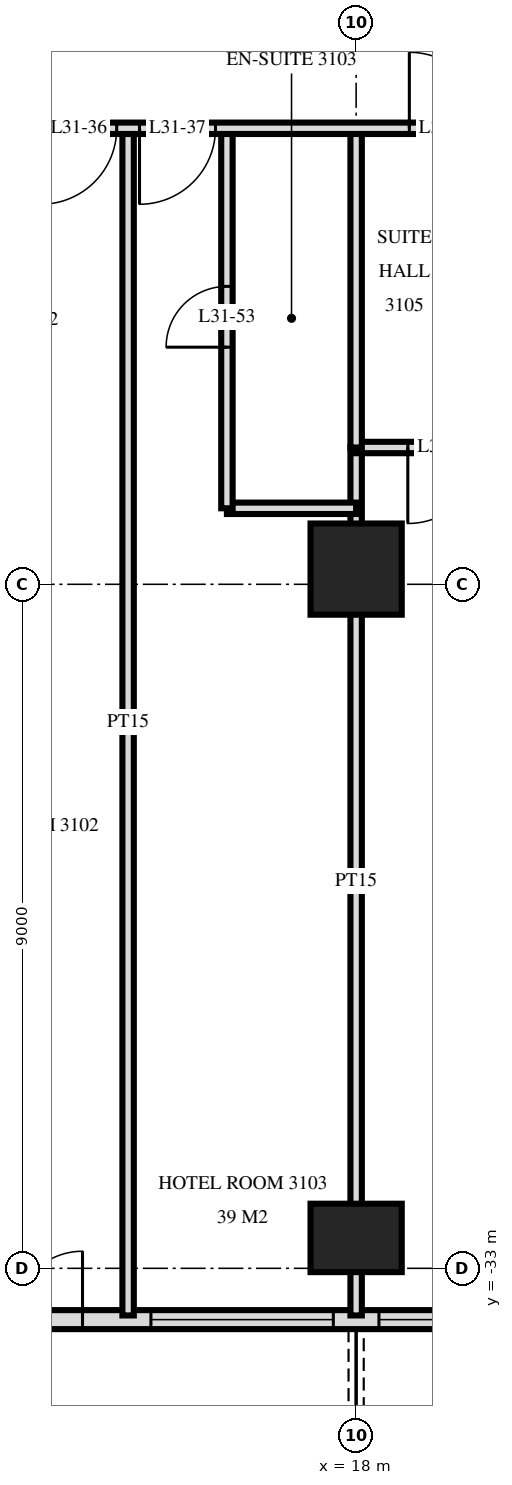
"""IFC4 building model, lengths in metres.
Left out: names, types, materials, properties, quantities, classifications, styles, units other than length and angle.
Written with IfcOpenShell. Run it as: python <this file> out.ifc"""

import sys

from ifc_helpers import new_model, si_unit, direction, frame, frame_2d, origin, origin_2d, place, context, subcontext, project, spatial, rectangle, extrude, element, fill, save


model = new_model("IFC4")
c1 = context("Model", 3, precision=1e-05, world=origin(), true_north=direction((0.0, 1.0)))
c2 = subcontext(c1, "Body", "Model", "MODEL_VIEW")
j1 = project(units=[si_unit("LENGTHUNIT", "METRE"), si_unit("PLANEANGLEUNIT", "RADIAN")], contexts=[c1])
p1 = place(None, origin())
s1 = spatial("IfcSite", under=j1, at=p1, CompositionType="ELEMENT")
p2 = place(p1, origin())
s2 = spatial("IfcBuilding", under=s1, at=p2, CompositionType="ELEMENT")
p3 = place(p2, frame((0.0, 0.0, 123.6)))
s3 = spatial("IfcBuildingStorey", under=s2, at=p3, CompositionType="ELEMENT", Elevation=123.6)
p4 = place(p3, frame((18.0, -32.6, 0.0), z_axis=(0.0, 0.0, 1.0), x_axis=(1.0, 0.0, 0.0)))
e1 = element("IfcColumn", 1, at=p4, inside=s3, PredefinedType="COLUMN", context=c2, shape_type="SweptSolid", body=[
    extrude(rectangle(XDim=1.2, YDim=0.9, at=origin_2d()), origin(), (0.0, 0.0, 1.0), 3.6),
])
p5 = place(p3, frame((18.0, -23.8, 0.0), z_axis=(0.0, 0.0, 1.0), x_axis=(1.0, 0.0, 0.0)))
e2 = element("IfcColumn", 2, at=p5, inside=s3, PredefinedType="COLUMN", context=c2, shape_type="SweptSolid", body=[
    extrude(rectangle(XDim=1.2, YDim=1.2, at=origin_2d()), origin(), (0.0, 0.0, 1.0), 3.6),
])
p6 = place(p3, frame((-23.675, -33.675, 0.0), z_axis=(0.0, 0.0, 1.0), x_axis=(1.0, 0.0, 0.0)))
e3 = element("IfcWall", 3, at=p6, inside=s3, PredefinedType="SOLIDWALL", context=c2, shape_type="SweptSolid", body=[
    extrude(rectangle(XDim=47.351, YDim=0.25, at=frame_2d((23.675, 0.0))), origin(), (0.0, 0.0, 1.0), 3.32),
])
p7 = place(p6, frame((3.425, 0.0, 0.0)))
e4 = element("IfcOpeningElement", 4, at=p7, cuts=e3, PredefinedType="OPENING", context=c2, shape_type="SweptSolid", body=[
    extrude(rectangle(XDim=1.8, YDim=2.4, at=frame_2d((0.9, 1.2))), frame((0.0, 0.135, 0.0), z_axis=(0.0, -1.0, 0.0), x_axis=(1.0, 0.0, 0.0)), (0.0, 0.0, 1.0), 0.27),
])
p8 = place(p6, frame((6.275, 0.0, 0.0)))
e5 = element("IfcOpeningElement", 5, at=p8, cuts=e3, PredefinedType="OPENING", context=c2, shape_type="SweptSolid", body=[
    extrude(rectangle(XDim=1.8, YDim=2.4, at=frame_2d((0.9, 1.2))), frame((0.0, 0.135, 0.0), z_axis=(0.0, -1.0, 0.0), x_axis=(1.0, 0.0, 0.0)), (0.0, 0.0, 1.0), 0.27),
])
p9 = place(p6, frame((8.975, 0.0, 0.3)))
e6 = element("IfcOpeningElement", 6, at=p9, cuts=e3, PredefinedType="OPENING", context=c2, shape_type="SweptSolid", body=[
    extrude(rectangle(XDim=2.4, YDim=2.1, at=frame_2d((1.2, 1.05))), frame((0.0, 0.135, 0.0), z_axis=(0.0, -1.0, 0.0), x_axis=(1.0, 0.0, 0.0)), (0.0, 0.0, 1.0), 0.27),
])
p10 = place(p6, frame((12.275, 0.0, 0.0)))
e7 = element("IfcOpeningElement", 7, at=p10, cuts=e3, PredefinedType="OPENING", context=c2, shape_type="SweptSolid", body=[
    extrude(rectangle(XDim=1.8, YDim=2.4, at=frame_2d((0.9, 1.2))), frame((0.0, 0.135, 0.0), z_axis=(0.0, -1.0, 0.0), x_axis=(1.0, 0.0, 0.0)), (0.0, 0.0, 1.0), 0.27),
])
p11 = place(p6, frame((14.975, 0.0, 0.3)))
e8 = element("IfcOpeningElement", 8, at=p11, cuts=e3, PredefinedType="OPENING", context=c2, shape_type="SweptSolid", body=[
    extrude(rectangle(XDim=2.4, YDim=2.1, at=frame_2d((1.2, 1.05))), frame((0.0, 0.135, 0.0), z_axis=(0.0, -1.0, 0.0), x_axis=(1.0, 0.0, 0.0)), (0.0, 0.0, 1.0), 0.27),
])
p12 = place(p6, frame((17.975, 0.0, 0.3)))
e9 = element("IfcOpeningElement", 9, at=p12, cuts=e3, PredefinedType="OPENING", context=c2, shape_type="SweptSolid", body=[
    extrude(rectangle(XDim=2.4, YDim=2.1, at=frame_2d((1.2, 1.05))), frame((0.0, 0.135, 0.0), z_axis=(0.0, -1.0, 0.0), x_axis=(1.0, 0.0, 0.0)), (0.0, 0.0, 1.0), 0.27),
])
p13 = place(p6, frame((21.275, 0.0, 0.0)))
e10 = element("IfcOpeningElement", 10, at=p13, cuts=e3, PredefinedType="OPENING", context=c2, shape_type="SweptSolid", body=[
    extrude(rectangle(XDim=1.8, YDim=2.4, at=frame_2d((0.9, 1.2))), frame((0.0, 0.135, 0.0), z_axis=(0.0, -1.0, 0.0), x_axis=(1.0, 0.0, 0.0)), (0.0, 0.0, 1.0), 0.27),
])
p14 = place(p6, frame((24.275, 0.0, 0.0)))
e11 = element("IfcOpeningElement", 11, at=p14, cuts=e3, PredefinedType="OPENING", context=c2, shape_type="SweptSolid", body=[
    extrude(rectangle(XDim=1.8, YDim=2.4, at=frame_2d((0.9, 1.2))), frame((0.0, 0.135, 0.0), z_axis=(0.0, -1.0, 0.0), x_axis=(1.0, 0.0, 0.0)), (0.0, 0.0, 1.0), 0.27),
])
p15 = place(p6, frame((26.975, 0.0, 0.3)))
e12 = element("IfcOpeningElement", 12, at=p15, cuts=e3, PredefinedType="OPENING", context=c2, shape_type="SweptSolid", body=[
    extrude(rectangle(XDim=2.4, YDim=2.1, at=frame_2d((1.2, 1.05))), frame((0.0, 0.135, 0.0), z_axis=(0.0, -1.0, 0.0), x_axis=(1.0, 0.0, 0.0)), (0.0, 0.0, 1.0), 0.27),
])
p16 = place(p6, frame((30.275, 0.0, 0.0)))
e13 = element("IfcOpeningElement", 13, at=p16, cuts=e3, PredefinedType="OPENING", context=c2, shape_type="SweptSolid", body=[
    extrude(rectangle(XDim=1.8, YDim=2.4, at=frame_2d((0.9, 1.2))), frame((0.0, 0.135, 0.0), z_axis=(0.0, -1.0, 0.0), x_axis=(1.0, 0.0, 0.0)), (0.0, 0.0, 1.0), 0.27),
])
p17 = place(p6, frame((32.975, 0.0, 0.3)))
e14 = element("IfcOpeningElement", 14, at=p17, cuts=e3, PredefinedType="OPENING", context=c2, shape_type="SweptSolid", body=[
    extrude(rectangle(XDim=2.4, YDim=2.1, at=frame_2d((1.2, 1.05))), frame((0.0, 0.135, 0.0), z_axis=(0.0, -1.0, 0.0), x_axis=(1.0, 0.0, 0.0)), (0.0, 0.0, 1.0), 0.27),
])
p18 = place(p6, frame((36.275, 0.0, 0.0)))
e15 = element("IfcOpeningElement", 15, at=p18, cuts=e3, PredefinedType="OPENING", context=c2, shape_type="SweptSolid", body=[
    extrude(rectangle(XDim=1.8, YDim=2.4, at=frame_2d((0.9, 1.2))), frame((0.0, 0.135, 0.0), z_axis=(0.0, -1.0, 0.0), x_axis=(1.0, 0.0, 0.0)), (0.0, 0.0, 1.0), 0.27),
])
p19 = place(p6, frame((38.975, 0.0, 0.3)))
e16 = element("IfcOpeningElement", 16, at=p19, cuts=e3, PredefinedType="OPENING", context=c2, shape_type="SweptSolid", body=[
    extrude(rectangle(XDim=2.4, YDim=2.1, at=frame_2d((1.2, 1.05))), frame((0.0, 0.135, 0.0), z_axis=(0.0, -1.0, 0.0), x_axis=(1.0, 0.0, 0.0)), (0.0, 0.0, 1.0), 0.27),
])
p20 = place(p6, frame((41.975, 0.0, 0.3)))
e17 = element("IfcOpeningElement", 17, at=p20, cuts=e3, PredefinedType="OPENING", context=c2, shape_type="SweptSolid", body=[
    extrude(rectangle(XDim=2.4, YDim=2.1, at=frame_2d((1.2, 1.05))), frame((0.0, 0.135, 0.0), z_axis=(0.0, -1.0, 0.0), x_axis=(1.0, 0.0, 0.0)), (0.0, 0.0, 1.0), 0.27),
])
p21 = place(p6, frame((45.125, 0.0, 0.0)))
e18 = element("IfcOpeningElement", 18, at=p21, cuts=e3, PredefinedType="OPENING", context=c2, shape_type="SweptSolid", body=[
    extrude(rectangle(XDim=1.8, YDim=2.4, at=frame_2d((0.9, 1.2))), frame((0.0, 0.135, 0.0), z_axis=(0.0, -1.0, 0.0), x_axis=(1.0, 0.0, 0.0)), (0.0, 0.0, 1.0), 0.27),
])
p22 = place(p3, frame((18.0, -22.2, 0.0), z_axis=(0.0, 0.0, 1.0), x_axis=(0.0, 1.0, 0.0)))
e19 = element("IfcWall", 19, at=p22, inside=s3, PredefinedType="PARTITIONING", context=c2, shape_type="SweptSolid", body=[
    extrude(rectangle(XDim=4.2, YDim=0.15, at=frame_2d((2.1, 0.0))), origin(), (0.0, 0.0, 1.0), 3.32),
])
p23 = place(p3, frame((18.0, -33.62, 0.0), z_axis=(0.0, 0.0, 1.0), x_axis=(0.0, 1.0, 0.0)))
e20 = element("IfcWall", 20, at=p23, inside=s3, PredefinedType="PARTITIONING", context=c2, shape_type="SweptSolid", body=[
    extrude(rectangle(XDim=11.42, YDim=0.15, at=frame_2d((5.71, 0.0))), origin(), (0.0, 0.0, 1.0), 3.32),
])
p24 = place(p3, frame((16.3, -23.0, 0.0), z_axis=(0.0, 0.0, 1.0), x_axis=(0.0, 1.0, 0.0)))
e21 = element("IfcWall", 21, at=p24, inside=s3, PredefinedType="PARTITIONING", context=c2, shape_type="SweptSolid", body=[
    extrude(rectangle(XDim=5.0, YDim=0.15, at=frame_2d((2.5, 0.0))), origin(), (0.0, 0.0, 1.0), 3.32),
])
p25 = place(p24, frame((2.12, 0.0, 0.0)))
e22 = element("IfcOpeningElement", 22, at=p25, cuts=e21, PredefinedType="OPENING", context=c2, shape_type="SweptSolid", body=[
    extrude(rectangle(XDim=0.8, YDim=2.1, at=frame_2d((0.4, 1.05))), frame((0.0, 0.085, 0.0), z_axis=(0.0, -1.0, 0.0), x_axis=(1.0, 0.0, 0.0)), (0.0, 0.0, 1.0), 0.17),
])
p26 = place(p3, frame((15.0, -33.62, 0.0), z_axis=(0.0, 0.0, 1.0), x_axis=(0.0, 1.0, 0.0)))
e23 = element("IfcWall", 23, at=p26, inside=s3, PredefinedType="PARTITIONING", context=c2, shape_type="SweptSolid", body=[
    extrude(rectangle(XDim=15.62, YDim=0.15, at=frame_2d((7.81, 0.0))), origin(), (0.0, 0.0, 1.0), 3.32),
])
p27 = place(p3, frame((16.3, -23.0, 0.0), z_axis=(0.0, 0.0, 1.0), x_axis=(1.0, 0.0, 0.0)))
e24 = element("IfcWall", 24, at=p27, inside=s3, PredefinedType="PARTITIONING", context=c2, shape_type="SweptSolid", body=[
    extrude(rectangle(XDim=1.7, YDim=0.15, at=frame_2d((0.85, 0.0))), origin(), (0.0, 0.0, 1.0), 3.32),
])
p28 = place(p3, frame((18.0, -22.2, 0.0), z_axis=(0.0, 0.0, 1.0), x_axis=(1.0, 0.0, 0.0)))
e25 = element("IfcWall", 25, at=p28, inside=s3, PredefinedType="PARTITIONING", context=c2, shape_type="SweptSolid", body=[
    extrude(rectangle(XDim=2.4, YDim=0.15, at=frame_2d((1.2, 0.0))), origin(), (0.0, 0.0, 1.0), 3.32),
])
p29 = place(p28, frame((0.68, 0.0, 0.0)))
e26 = element("IfcOpeningElement", 26, at=p29, cuts=e25, PredefinedType="OPENING", context=c2, shape_type="SweptSolid", body=[
    extrude(rectangle(XDim=1.0, YDim=2.1, at=frame_2d((0.5, 1.05))), frame((0.0, 0.085, 0.0), z_axis=(0.0, -1.0, 0.0), x_axis=(1.0, 0.0, 0.0)), (0.0, 0.0, 1.0), 0.17),
])
p30 = place(p3, frame((-28.02, -18.0, 0.0), z_axis=(0.0, 0.0, 1.0), x_axis=(1.0, 0.0, 0.0)))
e27 = element("IfcWall", 27, at=p30, inside=s3, PredefinedType="PARTITIONING", context=c2, shape_type="SweptSolid", body=[
    extrude(rectangle(XDim=56.04, YDim=0.15, at=frame_2d((28.02, 0.0))), origin(), (0.0, 0.0, 1.0), 3.32),
])
p31 = place(p30, frame((13.17, 0.0, 0.0)))
e28 = element("IfcOpeningElement", 28, at=p31, cuts=e27, PredefinedType="OPENING", context=c2, shape_type="SweptSolid", body=[
    extrude(rectangle(XDim=1.0, YDim=2.1, at=frame_2d((0.5, 1.05))), frame((0.0, 0.085, 0.0), z_axis=(0.0, -1.0, 0.0), x_axis=(1.0, 0.0, 0.0)), (0.0, 0.0, 1.0), 0.17),
])
p32 = place(p30, frame((11.32, 0.0, 0.0)))
e29 = element("IfcOpeningElement", 29, at=p32, cuts=e27, PredefinedType="OPENING", context=c2, shape_type="SweptSolid", body=[
    extrude(rectangle(XDim=1.0, YDim=2.1, at=frame_2d((0.5, 1.05))), frame((0.0, 0.085, 0.0), z_axis=(0.0, -1.0, 0.0), x_axis=(1.0, 0.0, 0.0)), (0.0, 0.0, 1.0), 0.17),
])
p33 = place(p30, frame((41.87, 0.0, 0.0)))
e30 = element("IfcOpeningElement", 30, at=p33, cuts=e27, PredefinedType="OPENING", context=c2, shape_type="SweptSolid", body=[
    extrude(rectangle(XDim=1.0, YDim=2.1, at=frame_2d((0.5, 1.05))), frame((0.0, 0.085, 0.0), z_axis=(0.0, -1.0, 0.0), x_axis=(1.0, 0.0, 0.0)), (0.0, 0.0, 1.0), 0.17),
])
p34 = place(p30, frame((43.17, 0.0, 0.0)))
e31 = element("IfcOpeningElement", 31, at=p34, cuts=e27, PredefinedType="OPENING", context=c2, shape_type="SweptSolid", body=[
    extrude(rectangle(XDim=1.0, YDim=2.1, at=frame_2d((0.5, 1.05))), frame((0.0, 0.085, 0.0), z_axis=(0.0, -1.0, 0.0), x_axis=(1.0, 0.0, 0.0)), (0.0, 0.0, 1.0), 0.17),
])
p35 = place(p30, frame((46.72, 0.0, 0.0)))
e32 = element("IfcOpeningElement", 32, at=p35, cuts=e27, PredefinedType="OPENING", context=c2, shape_type="SweptSolid", body=[
    extrude(rectangle(XDim=1.0, YDim=2.1, at=frame_2d((0.5, 1.05))), frame((0.0, 0.085, 0.0), z_axis=(0.0, -1.0, 0.0), x_axis=(1.0, 0.0, 0.0)), (0.0, 0.0, 1.0), 0.17),
])
p36 = place(p30, frame((21.52, 0.0, 0.0)))
e33 = element("IfcOpeningElement", 33, at=p36, cuts=e27, PredefinedType="OPENING", context=c2, shape_type="SweptSolid", body=[
    extrude(rectangle(XDim=1.0, YDim=2.1, at=frame_2d((0.5, 1.05))), frame((0.0, 0.085, 0.0), z_axis=(0.0, -1.0, 0.0), x_axis=(1.0, 0.0, 0.0)), (0.0, 0.0, 1.0), 0.17),
])
p37 = place(p30, frame((33.52, 0.0, 0.0)))
e34 = element("IfcOpeningElement", 34, at=p37, cuts=e27, PredefinedType="OPENING", context=c2, shape_type="SweptSolid", body=[
    extrude(rectangle(XDim=1.0, YDim=2.1, at=frame_2d((0.5, 1.05))), frame((0.0, 0.085, 0.0), z_axis=(0.0, -1.0, 0.0), x_axis=(1.0, 0.0, 0.0)), (0.0, 0.0, 1.0), 0.17),
])
p38 = place(p18, origin())
e35 = element("IfcDoor", 35, at=p38, inside=s3, OperationType="DOUBLE_DOOR_SINGLE_SWING", PredefinedType="DOOR", context=c2, shape_type="SweptSolid", body=[
    extrude(rectangle(XDim=1.8, YDim=2.4, at=frame_2d((0.9, 1.2))), frame((0.0, 0.025, 0.0), z_axis=(0.0, -1.0, 0.0), x_axis=(1.0, 0.0, 0.0)), (0.0, 0.0, 1.0), 0.05),
])
fill(e15, e35)
p39 = place(p19, origin())
e36 = element("IfcWindow", 36, at=p39, inside=s3, PartitioningType="SINGLE_PANEL", PredefinedType="WINDOW", context=c2, shape_type="SweptSolid", body=[
    extrude(rectangle(XDim=2.4, YDim=2.1, at=frame_2d((1.2, 1.05))), frame((0.0, 0.03, 0.0), z_axis=(0.0, -1.0, 0.0), x_axis=(1.0, 0.0, 0.0)), (0.0, 0.0, 1.0), 0.06),
])
fill(e16, e36)
p40 = place(p20, origin())
e37 = element("IfcWindow", 37, at=p40, inside=s3, PartitioningType="SINGLE_PANEL", PredefinedType="WINDOW", context=c2, shape_type="SweptSolid", body=[
    extrude(rectangle(XDim=2.4, YDim=2.1, at=frame_2d((1.2, 1.05))), frame((0.0, 0.03, 0.0), z_axis=(0.0, -1.0, 0.0), x_axis=(1.0, 0.0, 0.0)), (0.0, 0.0, 1.0), 0.06),
])
fill(e17, e37)
p41 = place(p33, frame((0.5, 0.0, 0.0), z_axis=(0.0, 0.0, 1.0), x_axis=(-1.0, 0.0, 0.0)))
e38 = element("IfcDoor", 38, at=p41, inside=s3, OperationType="SINGLE_SWING_LEFT", PredefinedType="DOOR", context=c2, shape_type="SweptSolid", body=[
    extrude(rectangle(XDim=1.0, YDim=2.1, at=frame_2d((0.0, 1.05))), frame((0.0, -0.025, 0.0), z_axis=(0.0, 1.0, 0.0), x_axis=(-1.0, 0.0, 0.0)), (0.0, 0.0, 1.0), 0.05),
])
fill(e30, e38)
p42 = place(p34, frame((0.5, 0.0, 0.0), z_axis=(0.0, 0.0, 1.0), x_axis=(-1.0, 0.0, 0.0)))
e39 = element("IfcDoor", 39, at=p42, inside=s3, OperationType="SINGLE_SWING_LEFT", PredefinedType="DOOR", context=c2, shape_type="SweptSolid", body=[
    extrude(rectangle(XDim=1.0, YDim=2.1, at=frame_2d((0.0, 1.05))), frame((0.0, -0.025, 0.0), z_axis=(0.0, 1.0, 0.0), x_axis=(-1.0, 0.0, 0.0)), (0.0, 0.0, 1.0), 0.05),
])
fill(e31, e39)
p43 = place(p35, origin())
e40 = element("IfcDoor", 40, at=p43, inside=s3, OperationType="SINGLE_SWING_RIGHT", PredefinedType="DOOR", context=c2, shape_type="SweptSolid", body=[
    extrude(rectangle(XDim=1.0, YDim=2.1, at=frame_2d((0.5, 1.05))), frame((0.0, 0.025, 0.0), z_axis=(0.0, -1.0, 0.0), x_axis=(1.0, 0.0, 0.0)), (0.0, 0.0, 1.0), 0.05),
])
fill(e32, e40)
p44 = place(p25, origin())
e41 = element("IfcDoor", 41, at=p44, inside=s3, OperationType="SINGLE_SWING_RIGHT", PredefinedType="DOOR", context=c2, shape_type="SweptSolid", body=[
    extrude(rectangle(XDim=0.8, YDim=2.1, at=frame_2d((0.4, 1.05))), frame((0.0, 0.025, 0.0), z_axis=(0.0, -1.0, 0.0), x_axis=(1.0, 0.0, 0.0)), (0.0, 0.0, 1.0), 0.05),
])
fill(e22, e41)
p45 = place(p29, frame((0.5, 0.0, 0.0), z_axis=(0.0, 0.0, 1.0), x_axis=(-1.0, 0.0, 0.0)))
e42 = element("IfcDoor", 42, at=p45, inside=s3, OperationType="SINGLE_SWING_LEFT", PredefinedType="DOOR", context=c2, shape_type="SweptSolid", body=[
    extrude(rectangle(XDim=1.0, YDim=2.1, at=frame_2d((0.0, 1.05))), frame((0.0, -0.025, 0.0), z_axis=(0.0, 1.0, 0.0), x_axis=(-1.0, 0.0, 0.0)), (0.0, 0.0, 1.0), 0.05),
])
fill(e26, e42)
save(model, sys.argv[1])
